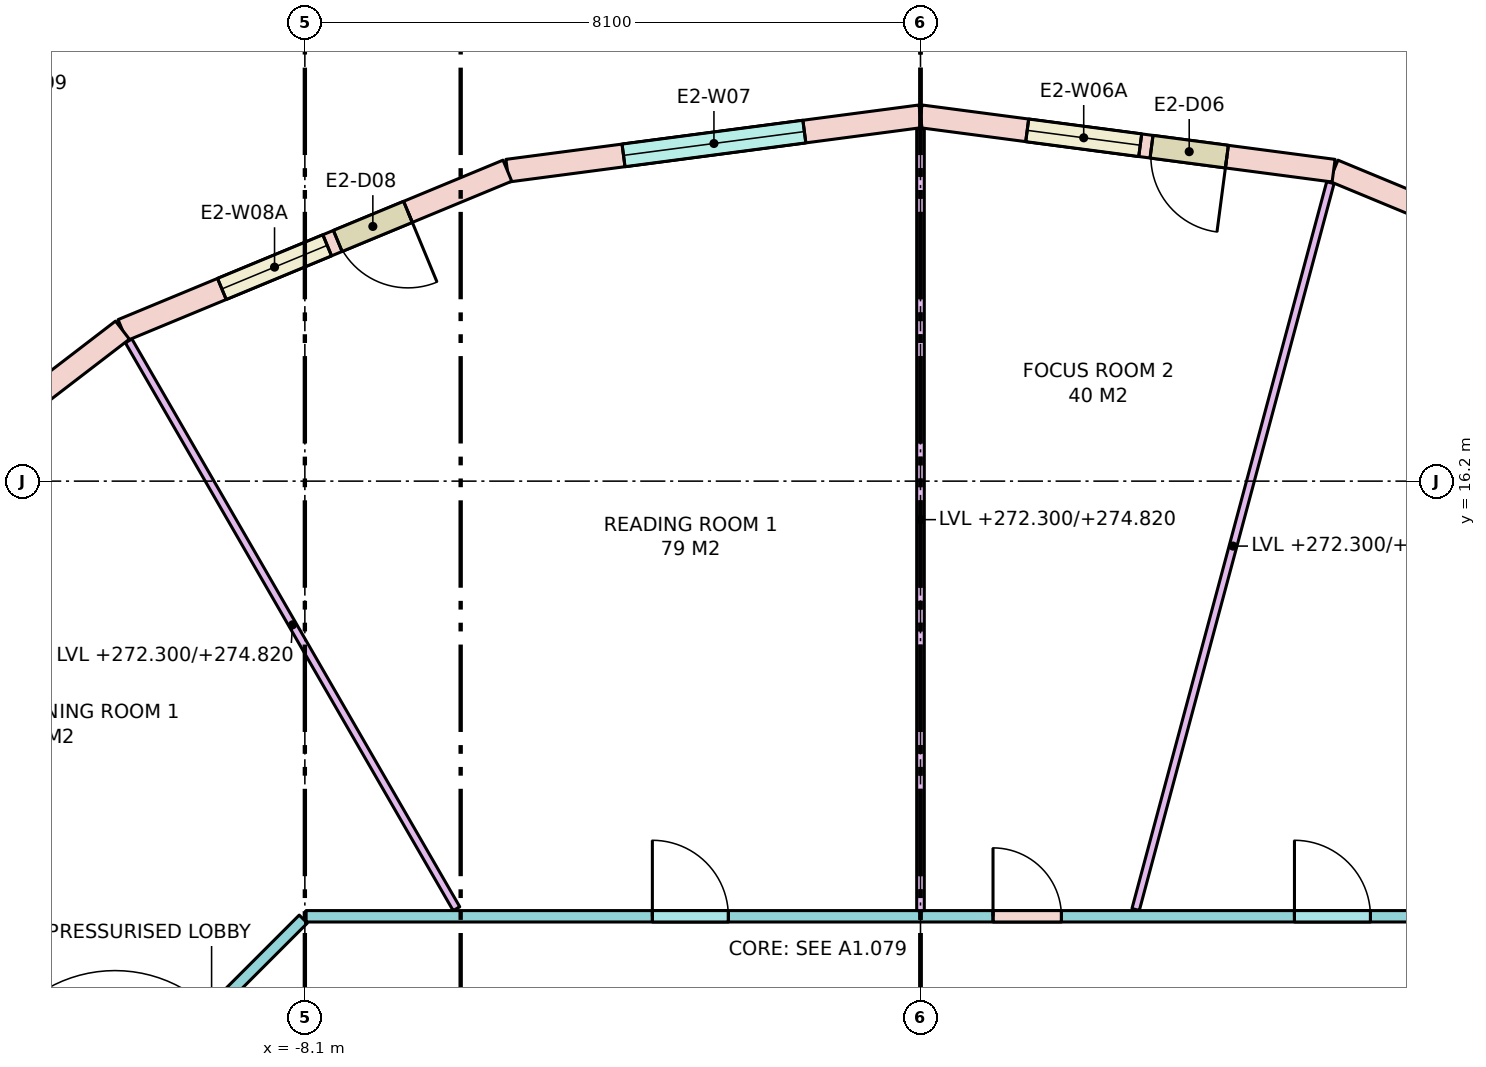
"""IFC4 building model, lengths in metres.
Left out: names, types, materials, properties, quantities, classifications, styles, units other than length and angle.
Written with IfcOpenShell. Run it as: python <this file> out.ifc"""

import sys

from ifc_helpers import new_model, si_unit, direction, frame, frame_2d, origin, place, context, subcontext, project, spatial, rectangle, extrude, element, fill, save


model = new_model("IFC4")
c1 = context("Model", 3, precision=1e-05, world=origin(), true_north=direction((0.0, 1.0)))
c2 = subcontext(c1, "Body", "Model", "MODEL_VIEW")
j1 = project(units=[si_unit("LENGTHUNIT", "METRE"), si_unit("PLANEANGLEUNIT", "RADIAN")], contexts=[c1])
p1 = place(None, origin())
s1 = spatial("IfcSite", under=j1, at=p1, CompositionType="ELEMENT")
p2 = place(p1, origin())
s2 = spatial("IfcBuilding", under=s1, at=p2, CompositionType="ELEMENT")
p3 = place(p2, frame((0.0, 0.0, 272.3)))
s3 = spatial("IfcBuildingStorey", under=s2, at=p3, CompositionType="ELEMENT", Elevation=272.3)
p4 = place(p3, frame((10.5, 18.187, 0.0), z_axis=(0.0, 0.0, 1.0), x_axis=(-0.923877333662, 0.382688740813, 0.0)))
e1 = element("IfcWall", 1, at=p4, inside=s3, PredefinedType="STANDARD", context=c2, shape_type="SweptSolid", body=[
    extrude(rectangle(XDim=5.482, YDim=0.3, at=frame_2d((2.741, 0.0))), origin(), (0.0, 0.0, 1.0), 3.42),
])
p5 = place(p4, frame((1.541, 0.0, 0.8)))
e2 = element("IfcOpeningElement", 2, at=p5, cuts=e1, PredefinedType="OPENING", context=c2, shape_type="SweptSolid", body=[
    extrude(rectangle(XDim=2.4, YDim=2.4, at=frame_2d((1.2, 1.2))), frame((0.0, 0.16, 0.0), z_axis=(0.0, -1.0, 0.0), x_axis=(1.0, 0.0, 0.0)), (0.0, 0.0, 1.0), 0.32),
])
p6 = place(p3, frame((5.435, 20.284, 0.0), z_axis=(0.0, 0.0, 1.0), x_axis=(-0.991444743541, 0.130527087244, 0.0)))
e3 = element("IfcWall", 3, at=p6, inside=s3, PredefinedType="STANDARD", context=c2, shape_type="SweptSolid", body=[
    extrude(rectangle(XDim=5.482, YDim=0.3, at=frame_2d((2.741, 0.0))), origin(), (0.0, 0.0, 1.0), 3.42),
])
p7 = place(p6, frame((1.416, 0.0, 0.0)))
e4 = element("IfcOpeningElement", 4, at=p7, cuts=e3, PredefinedType="OPENING", context=c2, shape_type="SweptSolid", body=[
    extrude(rectangle(XDim=1.0, YDim=2.4, at=frame_2d((0.5, 1.2))), frame((0.0, 0.16, 0.0), z_axis=(0.0, -1.0, 0.0), x_axis=(1.0, 0.0, 0.0)), (0.0, 0.0, 1.0), 0.32),
])
p8 = place(p6, frame((2.566, 0.0, 0.8)))
e5 = element("IfcOpeningElement", 5, at=p8, cuts=e3, PredefinedType="OPENING", context=c2, shape_type="SweptSolid", body=[
    extrude(rectangle(XDim=1.5, YDim=2.4, at=frame_2d((0.75, 1.2))), frame((0.0, 0.16, 0.0), z_axis=(0.0, -1.0, 0.0), x_axis=(1.0, 0.0, 0.0)), (0.0, 0.0, 1.0), 0.32),
])
p9 = place(p3, frame((0.0, 21.0, 0.0), z_axis=(0.0, 0.0, 1.0), x_axis=(-0.991444743541, -0.130527087244, 0.0)))
e6 = element("IfcWall", 6, at=p9, inside=s3, PredefinedType="STANDARD", context=c2, shape_type="SweptSolid", body=[
    extrude(rectangle(XDim=5.482, YDim=0.3, at=frame_2d((2.741, 0.0))), origin(), (0.0, 0.0, 1.0), 3.42),
])
p10 = place(p9, frame((1.541, 0.0, 0.8)))
e7 = element("IfcOpeningElement", 7, at=p10, cuts=e6, PredefinedType="OPENING", context=c2, shape_type="SweptSolid", body=[
    extrude(rectangle(XDim=2.4, YDim=2.4, at=frame_2d((1.2, 1.2))), frame((0.0, 0.16, 0.0), z_axis=(0.0, -1.0, 0.0), x_axis=(1.0, 0.0, 0.0)), (0.0, 0.0, 1.0), 0.32),
])
p11 = place(p3, frame((-5.435, 20.284, 0.0), z_axis=(0.0, 0.0, 1.0), x_axis=(-0.923877333662, -0.382688740813, 0.0)))
e8 = element("IfcWall", 8, at=p11, inside=s3, PredefinedType="STANDARD", context=c2, shape_type="SweptSolid", body=[
    extrude(rectangle(XDim=5.482, YDim=0.3, at=frame_2d((2.741, 0.0))), origin(), (0.0, 0.0, 1.0), 3.42),
])
p12 = place(p11, frame((1.416, 0.0, 0.0)))
e9 = element("IfcOpeningElement", 9, at=p12, cuts=e8, PredefinedType="OPENING", context=c2, shape_type="SweptSolid", body=[
    extrude(rectangle(XDim=1.0, YDim=2.4, at=frame_2d((0.5, 1.2))), frame((0.0, 0.16, 0.0), z_axis=(0.0, -1.0, 0.0), x_axis=(1.0, 0.0, 0.0)), (0.0, 0.0, 1.0), 0.32),
])
p13 = place(p11, frame((2.566, 0.0, 0.8)))
e10 = element("IfcOpeningElement", 10, at=p13, cuts=e8, PredefinedType="OPENING", context=c2, shape_type="SweptSolid", body=[
    extrude(rectangle(XDim=1.5, YDim=2.4, at=frame_2d((0.75, 1.2))), frame((0.0, 0.16, 0.0), z_axis=(0.0, -1.0, 0.0), x_axis=(1.0, 0.0, 0.0)), (0.0, 0.0, 1.0), 0.32),
])
p14 = place(p3, frame((-10.5, 18.187, 0.0), z_axis=(0.0, 0.0, 1.0), x_axis=(-0.793335336593, -0.608784891166, 0.0)))
e11 = element("IfcWall", 11, at=p14, inside=s3, PredefinedType="STANDARD", context=c2, shape_type="SweptSolid", body=[
    extrude(rectangle(XDim=5.482, YDim=0.3, at=frame_2d((2.741, 0.0))), origin(), (0.0, 0.0, 1.0), 3.42),
])
p15 = place(p14, frame((1.541, 0.0, 0.8)))
e12 = element("IfcOpeningElement", 12, at=p15, cuts=e11, PredefinedType="OPENING", context=c2, shape_type="SweptSolid", body=[
    extrude(rectangle(XDim=2.4, YDim=2.4, at=frame_2d((1.2, 1.2))), frame((0.0, 0.16, 0.0), z_axis=(0.0, -1.0, 0.0), x_axis=(1.0, 0.0, 0.0)), (0.0, 0.0, 1.0), 0.32),
])
p16 = place(p3, frame((-12.438, 6.121, 0.0), z_axis=(0.0, 0.0, 1.0), x_axis=(0.707106781187, 0.707106781187, 0.0)))
e13 = element("IfcWall", 13, at=p16, inside=s3, PredefinedType="PARTITIONING", context=c2, shape_type="SweptSolid", body=[
    extrude(rectangle(XDim=6.105, YDim=0.15, at=frame_2d((3.053, 0.0))), origin(), (0.0, 0.0, 1.0), 2.52),
])
p17 = place(p16, frame((2.602, 0.0, 0.0)))
e14 = element("IfcOpeningElement", 14, at=p17, cuts=e13, PredefinedType="OPENING", context=c2, shape_type="SweptSolid", body=[
    extrude(rectangle(XDim=1.8, YDim=2.1, at=frame_2d((0.9, 1.05))), frame((0.0, 0.085, 0.0), z_axis=(0.0, -1.0, 0.0), x_axis=(1.0, 0.0, 0.0)), (0.0, 0.0, 1.0), 0.17),
])
p18 = place(p3, frame((-8.084, 10.475, 0.0), z_axis=(0.0, 0.0, 1.0), x_axis=(1.0, 0.0, 0.0)))
e15 = element("IfcWall", 15, at=p18, inside=s3, PredefinedType="PARTITIONING", context=c2, shape_type="SweptSolid", body=[
    extrude(rectangle(XDim=16.167, YDim=0.15, at=frame_2d((8.084, 0.0))), origin(), (0.0, 0.0, 1.0), 2.52),
])
p19 = place(p18, frame((13.004, 0.0, 0.0)))
e16 = element("IfcOpeningElement", 16, at=p19, cuts=e15, PredefinedType="OPENING", context=c2, shape_type="SweptSolid", body=[
    extrude(rectangle(XDim=1.0, YDim=2.1, at=frame_2d((0.5, 1.05))), frame((0.0, 0.085, 0.0), z_axis=(0.0, -1.0, 0.0), x_axis=(1.0, 0.0, 0.0)), (0.0, 0.0, 1.0), 0.17),
])
p20 = place(p18, frame((9.038, 0.0, 0.0)))
e17 = element("IfcOpeningElement", 17, at=p20, cuts=e15, PredefinedType="OPENING", context=c2, shape_type="SweptSolid", body=[
    extrude(rectangle(XDim=0.9, YDim=2.1, at=frame_2d((0.45, 1.05))), frame((0.0, 0.085, 0.0), z_axis=(0.0, -1.0, 0.0), x_axis=(1.0, 0.0, 0.0)), (0.0, 0.0, 1.0), 0.17),
])
p21 = place(p18, frame((4.556, 0.0, 0.0)))
e18 = element("IfcOpeningElement", 18, at=p21, cuts=e15, PredefinedType="OPENING", context=c2, shape_type="SweptSolid", body=[
    extrude(rectangle(XDim=1.0, YDim=2.1, at=frame_2d((0.5, 1.05))), frame((0.0, 0.085, 0.0), z_axis=(0.0, -1.0, 0.0), x_axis=(1.0, 0.0, 0.0)), (0.0, 0.0, 1.0), 0.17),
])
p22 = place(p3, frame((2.831, 10.564, 0.0), z_axis=(0.0, 0.0, 1.0), x_axis=(0.258795254151, 0.965932200741, 0.0)))
e19 = element("IfcWall", 19, at=p22, inside=s3, PredefinedType="PARTITIONING", context=c2, shape_type="SweptSolid", body=[
    extrude(rectangle(XDim=9.9, YDim=0.1, at=frame_2d((4.95, 0.0))), origin(), (0.0, 0.0, 1.0), 2.52),
])
p23 = place(p3, frame((0.0, 10.55, 0.0), z_axis=(0.0, 0.0, 1.0), x_axis=(0.0, 1.0, 0.0)))
e20 = element("IfcWall", 20, at=p23, inside=s3, PredefinedType="PARTITIONING", context=c2, shape_type="SweptSolid", body=[
    extrude(rectangle(XDim=10.287, YDim=0.1, at=frame_2d((5.143, 0.0))), origin(), (0.0, 0.0, 1.0), 2.52),
])
p24 = place(p3, frame((-6.105, 10.575, 0.0), z_axis=(0.0, 0.0, 1.0), x_axis=(-0.50001399067, 0.866017326117, 0.0)))
e21 = element("IfcWall", 21, at=p24, inside=s3, PredefinedType="PARTITIONING", context=c2, shape_type="SweptSolid", body=[
    extrude(rectangle(XDim=8.626, YDim=0.1, at=frame_2d((4.313, 0.0))), origin(), (0.0, 0.0, 1.0), 2.52),
])
p25 = place(p7, origin())
e22 = element("IfcDoor", 22, at=p25, inside=s3, OperationType="SINGLE_SWING_LEFT", PredefinedType="DOOR", context=c2, shape_type="SweptSolid", body=[
    extrude(rectangle(XDim=1.0, YDim=2.4, at=frame_2d((0.5, 1.2))), frame((0.0, 0.025, 0.0), z_axis=(0.0, -1.0, 0.0), x_axis=(1.0, 0.0, 0.0)), (0.0, 0.0, 1.0), 0.05),
])
fill(e4, e22)
p26 = place(p8, origin())
e23 = element("IfcWindow", 23, at=p26, inside=s3, PartitioningType="SINGLE_PANEL", PredefinedType="WINDOW", context=c2, shape_type="SweptSolid", body=[
    extrude(rectangle(XDim=1.5, YDim=2.4, at=frame_2d((0.75, 1.2))), frame((0.0, 0.03, 0.0), z_axis=(0.0, -1.0, 0.0), x_axis=(1.0, 0.0, 0.0)), (0.0, 0.0, 1.0), 0.06),
])
fill(e5, e23)
p27 = place(p10, origin())
e24 = element("IfcWindow", 24, at=p27, inside=s3, PartitioningType="SINGLE_PANEL", PredefinedType="WINDOW", context=c2, shape_type="SweptSolid", body=[
    extrude(rectangle(XDim=2.4, YDim=2.4, at=frame_2d((1.2, 1.2))), frame((0.0, 0.03, 0.0), z_axis=(0.0, -1.0, 0.0), x_axis=(1.0, 0.0, 0.0)), (0.0, 0.0, 1.0), 0.06),
])
fill(e7, e24)
p28 = place(p12, origin())
e25 = element("IfcDoor", 25, at=p28, inside=s3, OperationType="SINGLE_SWING_LEFT", PredefinedType="DOOR", context=c2, shape_type="SweptSolid", body=[
    extrude(rectangle(XDim=1.0, YDim=2.4, at=frame_2d((0.5, 1.2))), frame((0.0, 0.025, 0.0), z_axis=(0.0, -1.0, 0.0), x_axis=(1.0, 0.0, 0.0)), (0.0, 0.0, 1.0), 0.05),
])
fill(e9, e25)
p29 = place(p13, origin())
e26 = element("IfcWindow", 26, at=p29, inside=s3, PartitioningType="SINGLE_PANEL", PredefinedType="WINDOW", context=c2, shape_type="SweptSolid", body=[
    extrude(rectangle(XDim=1.5, YDim=2.4, at=frame_2d((0.75, 1.2))), frame((0.0, 0.03, 0.0), z_axis=(0.0, -1.0, 0.0), x_axis=(1.0, 0.0, 0.0)), (0.0, 0.0, 1.0), 0.06),
])
fill(e10, e26)
p30 = place(p19, origin())
e27 = element("IfcDoor", 27, at=p30, inside=s3, OperationType="SINGLE_SWING_LEFT", PredefinedType="DOOR", context=c2, shape_type="SweptSolid", body=[
    extrude(rectangle(XDim=1.0, YDim=2.1, at=frame_2d((0.5, 1.05))), frame((0.0, 0.025, 0.0), z_axis=(0.0, -1.0, 0.0), x_axis=(1.0, 0.0, 0.0)), (0.0, 0.0, 1.0), 0.05),
])
fill(e16, e27)
p31 = place(p20, origin())
e28 = element("IfcDoor", 28, at=p31, inside=s3, OperationType="SINGLE_SWING_LEFT", PredefinedType="DOOR", context=c2, shape_type="SweptSolid", body=[
    extrude(rectangle(XDim=0.9, YDim=2.1, at=frame_2d((0.45, 1.05))), frame((0.0, 0.025, 0.0), z_axis=(0.0, -1.0, 0.0), x_axis=(1.0, 0.0, 0.0)), (0.0, 0.0, 1.0), 0.05),
])
fill(e17, e28)
p32 = place(p21, origin())
e29 = element("IfcDoor", 29, at=p32, inside=s3, OperationType="SINGLE_SWING_LEFT", PredefinedType="DOOR", context=c2, shape_type="SweptSolid", body=[
    extrude(rectangle(XDim=1.0, YDim=2.1, at=frame_2d((0.5, 1.05))), frame((0.0, 0.025, 0.0), z_axis=(0.0, -1.0, 0.0), x_axis=(1.0, 0.0, 0.0)), (0.0, 0.0, 1.0), 0.05),
])
fill(e18, e29)
save(model, sys.argv[1])
